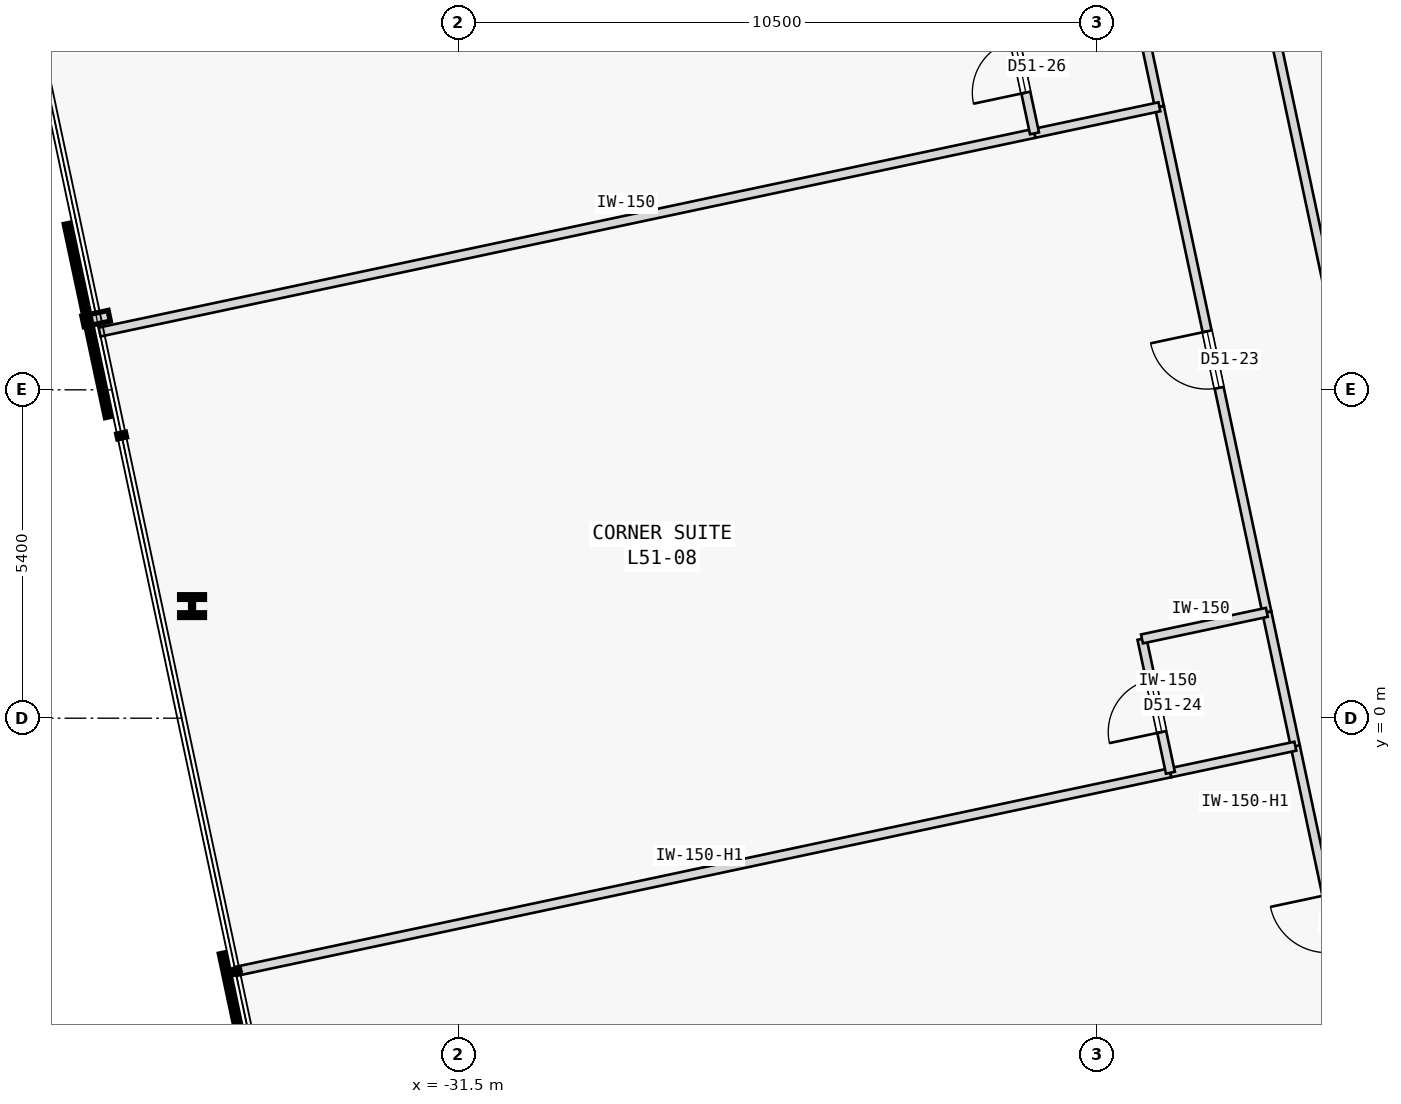
"""IFC4 building model, lengths in metres.
Left out: names, types, materials, properties, quantities, classifications, styles, units other than length and angle.
Written with IfcOpenShell. Run it as: python <this file> out.ifc"""

import sys

from ifc_helpers import new_model, si_unit, direction, frame, frame_2d, origin, origin_2d, place, context, subcontext, project, spatial, rectangle, i_section, extrude, element, fill, save


model = new_model("IFC4")
c1 = context("Model", 3, precision=1e-05, world=origin(), true_north=direction((0.0, 1.0)))
c2 = subcontext(c1, "Body", "Model", "MODEL_VIEW")
j1 = project(units=[si_unit("LENGTHUNIT", "METRE"), si_unit("PLANEANGLEUNIT", "RADIAN")], contexts=[c1])
p1 = place(None, origin())
s1 = spatial("IfcSite", under=j1, at=p1, CompositionType="ELEMENT")
p2 = place(p1, origin())
s2 = spatial("IfcBuilding", under=s1, at=p2, CompositionType="ELEMENT")
p3 = place(p2, frame((0.0, 0.0, 195.6)))
s3 = spatial("IfcBuildingStorey", under=s2, at=p3, CompositionType="ELEMENT", Elevation=195.6)
p4 = place(p3, frame((-35.883, 1.844, 0.0), z_axis=(0.0, 0.0, 1.0), x_axis=(1.0, 0.0, 0.0)))
e1 = element("IfcColumn", 1, at=p4, inside=s3, PredefinedType="COLUMN", context=c2, shape_type="SweptSolid", body=[
    extrude(i_section(OverallWidth=0.409, OverallDepth=0.374, WebThickness=0.048, FlangeThickness=0.077, FilletRadius=0.015, at=origin_2d()), origin(), (0.0, 0.0, 1.0), 3.4),
])
p5 = place(p3, frame((-17.162, 6.926, 0.0), z_axis=(0.0, 0.0, 1.0), x_axis=(-0.207911421929, 0.978147657888, 0.0)))
e2 = element("IfcWall", 2, at=p5, inside=s3, PredefinedType="PARTITIONING", context=c2, shape_type="SweptSolid", body=[
    extrude(rectangle(XDim=13.195, YDim=0.15, at=frame_2d((6.598, 0.0))), origin(), (0.0, 0.0, 1.0), 2.725),
])
p6 = place(p5, frame((6.137, 0.0, 0.0)))
e3 = element("IfcOpeningElement", 3, at=p6, cuts=e2, PredefinedType="OPENING", context=c2, shape_type="SweptSolid", body=[
    extrude(rectangle(XDim=0.92, YDim=2.15, at=frame_2d((0.46, 1.075))), frame((0.0, 0.085, 0.0), z_axis=(0.0, -1.0, 0.0), x_axis=(1.0, 0.0, 0.0)), (0.0, 0.0, 1.0), 0.17),
])
p7 = place(p3, frame((-15.972, -8.775, 0.0), z_axis=(0.0, 0.0, 1.0), x_axis=(-0.207894825434, 0.97815118543, 0.0)))
e4 = element("IfcWall", 4, at=p7, inside=s3, PredefinedType="PARTITIONING", context=c2, shape_type="SweptSolid", body=[
    extrude(rectangle(XDim=8.5, YDim=0.15, at=frame_2d((4.25, 0.0))), origin(), (0.0, 0.0, 1.0), 3.175),
])
p8 = place(p7, frame((5.05, 0.0, 0.0)))
e5 = element("IfcOpeningElement", 5, at=p8, cuts=e4, PredefinedType="OPENING", context=c2, shape_type="SweptSolid", body=[
    extrude(rectangle(XDim=0.95, YDim=2.15, at=frame_2d((0.475, 1.075))), frame((0.0, 0.085, 0.0), z_axis=(0.0, -1.0, 0.0), x_axis=(1.0, 0.0, 0.0)), (0.0, 0.0, 1.0), 0.17),
])
p9 = place(p3, frame((-18.207, 1.74, 0.0), z_axis=(0.0, 0.0, 1.0), x_axis=(-0.207922306475, 0.978145344246, 0.0)))
e6 = element("IfcWall", 6, at=p9, inside=s3, PredefinedType="PARTITIONING", context=c2, shape_type="SweptSolid", body=[
    extrude(rectangle(XDim=8.5, YDim=0.15, at=frame_2d((4.25, 0.0))), origin(), (0.0, 0.0, 1.0), 3.175),
])
p10 = place(p9, frame((3.775, 0.0, 0.0)))
e7 = element("IfcOpeningElement", 7, at=p10, cuts=e6, PredefinedType="OPENING", context=c2, shape_type="SweptSolid", body=[
    extrude(rectangle(XDim=0.95, YDim=2.15, at=frame_2d((0.475, 1.075))), frame((0.0, 0.085, 0.0), z_axis=(0.0, -1.0, 0.0), x_axis=(1.0, 0.0, 0.0)), (0.0, 0.0, 1.0), 0.17),
])
p11 = place(p3, frame((-17.739, -0.46, 0.0), z_axis=(0.0, 0.0, 1.0), x_axis=(-0.207891197838, 0.978151956427, 0.0)))
e8 = element("IfcWall", 8, at=p11, inside=s3, PredefinedType="PARTITIONING", context=c2, shape_type="SweptSolid", body=[
    extrude(rectangle(XDim=2.25, YDim=0.15, at=frame_2d((1.125, 0.0))), origin(), (0.0, 0.0, 1.0), 3.175),
])
p12 = place(p3, frame((-19.974, 10.055, 0.0), z_axis=(0.0, 0.0, 1.0), x_axis=(-0.207913264065, 0.978147266328, 0.0)))
e9 = element("IfcWall", 9, at=p12, inside=s3, PredefinedType="PARTITIONING", context=c2, shape_type="SweptSolid", body=[
    extrude(rectangle(XDim=2.25, YDim=0.15, at=frame_2d((1.125, 0.0))), origin(), (0.0, 0.0, 1.0), 3.175),
])
p13 = place(p3, frame((-35.168, -4.165, 0.0), z_axis=(0.0, 0.0, 1.0), x_axis=(0.978149296727, 0.207903711638, 0.0)))
e10 = element("IfcWall", 10, at=p13, inside=s3, PredefinedType="PARTITIONING", context=c2, shape_type="SweptSolid", body=[
    extrude(rectangle(XDim=15.718, YDim=0.15, at=frame_2d((7.859, 0.0))), origin(), (0.0, 0.0, 1.0), 2.725),
])
p14 = place(p3, frame((-19.793, -0.897, 0.0), z_axis=(0.0, 0.0, 1.0), x_axis=(0.978134617382, 0.207972763311, 0.0)))
e11 = element("IfcWall", 11, at=p14, inside=s3, PredefinedType="PARTITIONING", context=c2, shape_type="SweptSolid", body=[
    extrude(rectangle(XDim=2.1, YDim=0.15, at=frame_2d((1.05, 0.0))), origin(), (0.0, 0.0, 1.0), 2.725),
])
p15 = place(p3, frame((-19.793, -0.897, 0.0), z_axis=(0.0, 0.0, 1.0), x_axis=(-0.207891197838, 0.978151956427, 0.0)))
e12 = element("IfcWall", 12, at=p15, inside=s3, PredefinedType="PARTITIONING", context=c2, shape_type="SweptSolid", body=[
    extrude(rectangle(XDim=2.25, YDim=0.15, at=frame_2d((1.125, 0.0))), origin(), (0.0, 0.0, 1.0), 3.175),
])
p16 = place(p15, frame((0.685, 0.0, 0.0)))
e13 = element("IfcOpeningElement", 13, at=p16, cuts=e12, PredefinedType="OPENING", context=c2, shape_type="SweptSolid", body=[
    extrude(rectangle(XDim=0.88, YDim=2.15, at=frame_2d((0.44, 1.075))), frame((0.0, 0.085, 0.0), z_axis=(0.0, -1.0, 0.0), x_axis=(1.0, 0.0, 0.0)), (0.0, 0.0, 1.0), 0.17),
])
p17 = place(p3, frame((-20.261, 1.304, 0.0), z_axis=(0.0, 0.0, 1.0), x_axis=(0.978134617382, 0.207972763311, 0.0)))
e14 = element("IfcWall", 14, at=p17, inside=s3, PredefinedType="PARTITIONING", context=c2, shape_type="SweptSolid", body=[
    extrude(rectangle(XDim=2.1, YDim=0.15, at=frame_2d((1.05, 0.0))), origin(), (0.0, 0.0, 1.0), 3.175),
])
p18 = place(p3, frame((-37.403, 6.35, 0.0), z_axis=(0.0, 0.0, 1.0), x_axis=(0.978149296727, 0.207903711638, 0.0)))
e15 = element("IfcWall", 15, at=p18, inside=s3, PredefinedType="PARTITIONING", context=c2, shape_type="SweptSolid", body=[
    extrude(rectangle(XDim=15.718, YDim=0.15, at=frame_2d((7.859, 0.0))), origin(), (0.0, 0.0, 1.0), 3.175),
])
p19 = place(p3, frame((-22.029, 9.618, 0.0), z_axis=(0.0, 0.0, 1.0), x_axis=(0.978134617382, 0.207972763311, 0.0)))
e16 = element("IfcWall", 16, at=p19, inside=s3, PredefinedType="PARTITIONING", context=c2, shape_type="SweptSolid", body=[
    extrude(rectangle(XDim=2.1, YDim=0.15, at=frame_2d((1.05, 0.0))), origin(), (0.0, 0.0, 1.0), 3.175),
])
p20 = place(p3, frame((-22.029, 9.618, 0.0), z_axis=(0.0, 0.0, 1.0), x_axis=(-0.207891197838, 0.978151956427, 0.0)))
e17 = element("IfcWall", 17, at=p20, inside=s3, PredefinedType="PARTITIONING", context=c2, shape_type="SweptSolid", body=[
    extrude(rectangle(XDim=2.25, YDim=0.15, at=frame_2d((1.125, 0.0))), origin(), (0.0, 0.0, 1.0), 3.175),
])
p21 = place(p20, frame((0.685, 0.0, 0.0)))
e18 = element("IfcOpeningElement", 18, at=p21, cuts=e17, PredefinedType="OPENING", context=c2, shape_type="SweptSolid", body=[
    extrude(rectangle(XDim=0.88, YDim=2.15, at=frame_2d((0.44, 1.075))), frame((0.0, 0.085, 0.0), z_axis=(0.0, -1.0, 0.0), x_axis=(1.0, 0.0, 0.0)), (0.0, 0.0, 1.0), 0.17),
])
p22 = place(p10, origin())
e19 = element("IfcDoor", 19, at=p22, inside=s3, OperationType="SINGLE_SWING_RIGHT", PredefinedType="DOOR", context=c2, shape_type="SweptSolid", body=[
    extrude(rectangle(XDim=0.95, YDim=2.15, at=frame_2d((0.475, 1.075))), frame((0.0, 0.025, 0.0), z_axis=(0.0, -1.0, 0.0), x_axis=(1.0, 0.0, 0.0)), (0.0, 0.0, 1.0), 0.05),
])
fill(e7, e19)
p23 = place(p16, origin())
e20 = element("IfcDoor", 20, at=p23, inside=s3, OperationType="SINGLE_SWING_LEFT", PredefinedType="DOOR", context=c2, shape_type="SweptSolid", body=[
    extrude(rectangle(XDim=0.88, YDim=2.15, at=frame_2d((0.44, 1.075))), frame((0.0, 0.025, 0.0), z_axis=(0.0, -1.0, 0.0), x_axis=(1.0, 0.0, 0.0)), (0.0, 0.0, 1.0), 0.05),
])
fill(e13, e20)
p24 = place(p21, origin())
e21 = element("IfcDoor", 21, at=p24, inside=s3, OperationType="SINGLE_SWING_LEFT", PredefinedType="DOOR", context=c2, shape_type="SweptSolid", body=[
    extrude(rectangle(XDim=0.88, YDim=2.15, at=frame_2d((0.44, 1.075))), frame((0.0, 0.025, 0.0), z_axis=(0.0, -1.0, 0.0), x_axis=(1.0, 0.0, 0.0)), (0.0, 0.0, 1.0), 0.05),
])
fill(e18, e21)
save(model, sys.argv[1])
